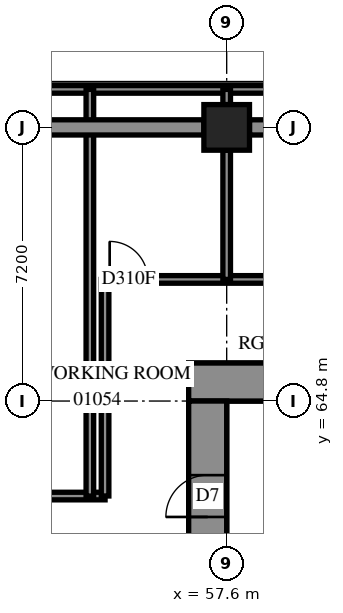
"""IFC4 building model, lengths in metres.
Left out: names, types, materials, properties, quantities, classifications, styles, units other than length and angle.
Written with IfcOpenShell. Run it as: python <this file> out.ifc"""

import sys

from ifc_helpers import new_model, si_unit, direction, frame, frame_2d, origin, origin_2d, place, context, subcontext, project, spatial, rectangle, extrude, element, fill, save


model = new_model("IFC4")
c1 = context("Model", 3, precision=1e-05, world=origin(), true_north=direction((0.0, 1.0)))
c2 = subcontext(c1, "Body", "Model", "MODEL_VIEW")
j1 = project(units=[si_unit("LENGTHUNIT", "METRE"), si_unit("PLANEANGLEUNIT", "RADIAN")], contexts=[c1])
p1 = place(None, origin())
s1 = spatial("IfcSite", under=j1, at=p1, CompositionType="ELEMENT")
p2 = place(p1, origin())
s2 = spatial("IfcBuilding", under=s1, at=p2, CompositionType="ELEMENT")
p3 = place(p2, frame((0.0, 0.0, 6.0)))
s3 = spatial("IfcBuildingStorey", under=s2, at=p3, CompositionType="ELEMENT", Elevation=6.0)
p4 = place(p3, frame((57.6, 72.0, 0.0), z_axis=(0.0, 0.0, 1.0), x_axis=(1.0, 0.0, 0.0)))
e1 = element("IfcColumn", 1, at=p4, inside=s3, PredefinedType="COLUMN", context=c2, shape_type="SweptSolid", body=[
    extrude(rectangle(XDim=1.2, YDim=1.2, at=origin_2d()), origin(), (0.0, 0.0, 1.0), 3.8),
])
p5 = place(p3, frame((56.6, 65.3, -0.4), z_axis=(0.0, 0.0, 1.0), x_axis=(1.0, 0.0, 0.0)))
e2 = element("IfcWall", 2, at=p5, inside=s3, PredefinedType="SHEAR", context=c2, shape_type="SweptSolid", body=[
    extrude(rectangle(XDim=16.4, YDim=1.0, at=frame_2d((8.2, 0.0))), origin(), (0.0, 0.0, 1.0), 3.5),
])
p6 = place(p5, frame((11.0, 0.0, 0.4)))
e3 = element("IfcOpeningElement", 3, at=p6, cuts=e2, PredefinedType="OPENING", context=c2, shape_type="SweptSolid", body=[
    extrude(rectangle(XDim=0.8, YDim=2.1, at=frame_2d((0.4, 1.05))), frame((0.0, 0.51, 0.0), z_axis=(0.0, -1.0, 0.0), x_axis=(1.0, 0.0, 0.0)), (0.0, 0.0, 1.0), 1.02),
])
p7 = place(p3, frame((57.1, 50.4, -0.4), z_axis=(0.0, 0.0, 1.0), x_axis=(0.0, 1.0, 0.0)))
e4 = element("IfcWall", 4, at=p7, inside=s3, PredefinedType="SHEAR", context=c2, shape_type="SweptSolid", body=[
    extrude(rectangle(XDim=14.4, YDim=1.0, at=frame_2d((7.2, 0.0))), origin(), (0.0, 0.0, 1.0), 3.5),
])
p8 = place(p7, frame((4.55, 0.0, 0.4)))
e5 = element("IfcOpeningElement", 5, at=p8, cuts=e4, PredefinedType="OPENING", context=c2, shape_type="SweptSolid", body=[
    extrude(rectangle(XDim=1.1, YDim=2.1, at=frame_2d((0.55, 1.05))), frame((0.0, 0.51, 0.0), z_axis=(0.0, -1.0, 0.0), x_axis=(1.0, 0.0, 0.0)), (0.0, 0.0, 1.0), 1.02),
])
p9 = place(p7, frame((11.35, 0.0, 0.4)))
e6 = element("IfcOpeningElement", 6, at=p9, cuts=e4, PredefinedType="OPENING", context=c2, shape_type="SweptSolid", body=[
    extrude(rectangle(XDim=1.1, YDim=2.1, at=frame_2d((0.55, 1.05))), frame((0.0, 0.51, 0.0), z_axis=(0.0, -1.0, 0.0), x_axis=(1.0, 0.0, 0.0)), (0.0, 0.0, 1.0), 1.02),
])
p10 = place(p3, frame((6.0, 73.0, 0.0), z_axis=(0.0, 0.0, 1.0), x_axis=(1.0, 0.0, 0.0)))
e7 = element("IfcWall", 7, at=p10, inside=s3, PredefinedType="PARTITIONING", context=c2, shape_type="SweptSolid", body=[
    extrude(rectangle(XDim=73.2, YDim=0.2, at=frame_2d((36.6, 0.0))), origin(), (0.0, 0.0, 1.0), 3.8),
])
p11 = place(p3, frame((0.002, 62.3, 0.0), z_axis=(0.0, 0.0, 1.0), x_axis=(1.0, 0.0, 0.0)))
e8 = element("IfcWall", 8, at=p11, inside=s3, PredefinedType="PARTITIONING", context=c2, shape_type="SweptSolid", body=[
    extrude(rectangle(XDim=54.398, YDim=0.2, at=frame_2d((27.199, 0.0))), origin(), (0.0, 0.0, 1.0), 3.8),
])
p12 = place(p11, frame((8.667, 0.0, 0.0)))
e9 = element("IfcOpeningElement", 9, at=p12, cuts=e8, PredefinedType="OPENING", context=c2, shape_type="SweptSolid", body=[
    extrude(rectangle(XDim=1.0, YDim=2.1, at=frame_2d((0.5, 1.05))), frame((0.0, 0.11, 0.0), z_axis=(0.0, -1.0, 0.0), x_axis=(1.0, 0.0, 0.0)), (0.0, 0.0, 1.0), 0.22),
])
p13 = place(p11, frame((13.136, 0.0, 0.0)))
e10 = element("IfcOpeningElement", 10, at=p13, cuts=e8, PredefinedType="OPENING", context=c2, shape_type="SweptSolid", body=[
    extrude(rectangle(XDim=1.0, YDim=2.1, at=frame_2d((0.5, 1.05))), frame((0.0, 0.11, 0.0), z_axis=(0.0, -1.0, 0.0), x_axis=(1.0, 0.0, 0.0)), (0.0, 0.0, 1.0), 0.22),
])
p14 = place(p11, frame((18.566, 0.0, 0.0)))
e11 = element("IfcOpeningElement", 11, at=p14, cuts=e8, PredefinedType="OPENING", context=c2, shape_type="SweptSolid", body=[
    extrude(rectangle(XDim=1.0, YDim=2.1, at=frame_2d((0.5, 1.05))), frame((0.0, 0.11, 0.0), z_axis=(0.0, -1.0, 0.0), x_axis=(1.0, 0.0, 0.0)), (0.0, 0.0, 1.0), 0.22),
])
p15 = place(p11, frame((27.256, 0.0, 0.0)))
e12 = element("IfcOpeningElement", 12, at=p15, cuts=e8, PredefinedType="OPENING", context=c2, shape_type="SweptSolid", body=[
    extrude(rectangle(XDim=1.0, YDim=2.1, at=frame_2d((0.5, 1.05))), frame((0.0, 0.11, 0.0), z_axis=(0.0, -1.0, 0.0), x_axis=(1.0, 0.0, 0.0)), (0.0, 0.0, 1.0), 0.22),
])
p16 = place(p11, frame((34.736, 0.0, 0.0)))
e13 = element("IfcOpeningElement", 13, at=p16, cuts=e8, PredefinedType="OPENING", context=c2, shape_type="SweptSolid", body=[
    extrude(rectangle(XDim=1.0, YDim=2.1, at=frame_2d((0.5, 1.05))), frame((0.0, 0.11, 0.0), z_axis=(0.0, -1.0, 0.0), x_axis=(1.0, 0.0, 0.0)), (0.0, 0.0, 1.0), 0.22),
])
p17 = place(p11, frame((40.166, 0.0, 0.0)))
e14 = element("IfcOpeningElement", 14, at=p17, cuts=e8, PredefinedType="OPENING", context=c2, shape_type="SweptSolid", body=[
    extrude(rectangle(XDim=1.0, YDim=2.1, at=frame_2d((0.5, 1.05))), frame((0.0, 0.11, 0.0), z_axis=(0.0, -1.0, 0.0), x_axis=(1.0, 0.0, 0.0)), (0.0, 0.0, 1.0), 0.22),
])
p18 = place(p11, frame((45.291, 0.0, 0.0)))
e15 = element("IfcOpeningElement", 15, at=p18, cuts=e8, PredefinedType="OPENING", context=c2, shape_type="SweptSolid", body=[
    extrude(rectangle(XDim=1.0, YDim=2.1, at=frame_2d((0.5, 1.05))), frame((0.0, 0.11, 0.0), z_axis=(0.0, -1.0, 0.0), x_axis=(1.0, 0.0, 0.0)), (0.0, 0.0, 1.0), 0.22),
])
p19 = place(p11, frame((49.136, 0.0, 0.0)))
e16 = element("IfcOpeningElement", 16, at=p19, cuts=e8, PredefinedType="OPENING", context=c2, shape_type="SweptSolid", body=[
    extrude(rectangle(XDim=1.0, YDim=2.1, at=frame_2d((0.5, 1.05))), frame((0.0, 0.11, 0.0), z_axis=(0.0, -1.0, 0.0), x_axis=(1.0, 0.0, 0.0)), (0.0, 0.0, 1.0), 0.22),
])
p20 = place(p11, frame((4.807, 0.0, 0.0)))
e17 = element("IfcOpeningElement", 17, at=p20, cuts=e8, PredefinedType="OPENING", context=c2, shape_type="SweptSolid", body=[
    extrude(rectangle(XDim=1.0, YDim=2.1, at=frame_2d((0.5, 1.05))), frame((0.0, 0.11, 0.0), z_axis=(0.0, -1.0, 0.0), x_axis=(1.0, 0.0, 0.0)), (0.0, 0.0, 1.0), 0.22),
])
p21 = place(p3, frame((54.4, 68.0, 0.0), z_axis=(0.0, 0.0, 1.0), x_axis=(1.0, 0.0, 0.0)))
e18 = element("IfcWall", 18, at=p21, inside=s3, PredefinedType="PARTITIONING", context=c2, shape_type="SweptSolid", body=[
    extrude(rectangle(XDim=20.8, YDim=0.2, at=frame_2d((10.4, 0.0))), origin(), (0.0, 0.0, 1.0), 3.8),
])
p22 = place(p21, frame((0.121, 0.0, 0.0)))
e19 = element("IfcOpeningElement", 19, at=p22, cuts=e18, PredefinedType="OPENING", context=c2, shape_type="SweptSolid", body=[
    extrude(rectangle(XDim=1.0, YDim=2.1, at=frame_2d((0.5, 1.05))), frame((0.0, 0.11, 0.0), z_axis=(0.0, -1.0, 0.0), x_axis=(1.0, 0.0, 0.0)), (0.0, 0.0, 1.0), 0.22),
])
p23 = place(p21, frame((19.622, 0.0, 0.0)))
e20 = element("IfcOpeningElement", 20, at=p23, cuts=e18, PredefinedType="OPENING", context=c2, shape_type="SweptSolid", body=[
    extrude(rectangle(XDim=1.0, YDim=2.1, at=frame_2d((0.5, 1.05))), frame((0.0, 0.11, 0.0), z_axis=(0.0, -1.0, 0.0), x_axis=(1.0, 0.0, 0.0)), (0.0, 0.0, 1.0), 0.22),
])
p24 = place(p21, frame((8.858, 0.0, 0.0)))
e21 = element("IfcOpeningElement", 21, at=p24, cuts=e18, PredefinedType="OPENING", context=c2, shape_type="SweptSolid", body=[
    extrude(rectangle(XDim=1.0, YDim=2.1, at=frame_2d((0.5, 1.05))), frame((0.0, 0.11, 0.0), z_axis=(0.0, -1.0, 0.0), x_axis=(1.0, 0.0, 0.0)), (0.0, 0.0, 1.0), 0.22),
])
p25 = place(p21, frame((14.568, 0.0, 0.0)))
e22 = element("IfcOpeningElement", 22, at=p25, cuts=e18, PredefinedType="OPENING", context=c2, shape_type="SweptSolid", body=[
    extrude(rectangle(XDim=1.0, YDim=2.1, at=frame_2d((0.5, 1.05))), frame((0.0, 0.11, 0.0), z_axis=(0.0, -1.0, 0.0), x_axis=(1.0, 0.0, 0.0)), (0.0, 0.0, 1.0), 0.22),
])
p26 = place(p3, frame((54.0, 62.3, 0.0), z_axis=(0.0, 0.0, 1.0), x_axis=(0.0, 1.0, 0.0)))
e23 = element("IfcWall", 23, at=p26, inside=s3, PredefinedType="PARTITIONING", context=c2, shape_type="SweptSolid", body=[
    extrude(rectangle(XDim=10.7, YDim=0.2, at=frame_2d((5.35, 0.0))), origin(), (0.0, 0.0, 1.0), 3.8),
])
p27 = place(p3, frame((54.4, 62.302, 0.0), z_axis=(0.0, 0.0, 1.0), x_axis=(0.0, 1.0, 0.0)))
e24 = element("IfcWall", 24, at=p27, inside=s3, PredefinedType="PARTITIONING", context=c2, shape_type="SweptSolid", body=[
    extrude(rectangle(XDim=5.698, YDim=0.2, at=frame_2d((2.849, 0.0))), origin(), (0.0, 0.0, 1.0), 3.8),
])
p28 = place(p3, frame((57.6, 68.0, 0.0), z_axis=(0.0, 0.0, 1.0), x_axis=(0.0, 1.0, 0.0)))
e25 = element("IfcWall", 25, at=p28, inside=s3, PredefinedType="PARTITIONING", context=c2, shape_type="SweptSolid", body=[
    extrude(rectangle(XDim=3.4, YDim=0.2, at=frame_2d((1.7, 0.0))), origin(), (0.0, 0.0, 1.0), 3.8),
])
p29 = place(p3, frame((57.6, 72.6, 0.0), z_axis=(0.0, 0.0, 1.0), x_axis=(0.0, 1.0, 0.0)))
e26 = element("IfcWall", 26, at=p29, inside=s3, PredefinedType="PARTITIONING", context=c2, shape_type="SweptSolid", body=[
    extrude(rectangle(XDim=0.4, YDim=0.2, at=frame_2d((0.2, 0.0))), origin(), (0.0, 0.0, 1.0), 3.8),
])
p30 = place(p9, origin())
e27 = element("IfcDoor", 27, at=p30, inside=s3, OperationType="SINGLE_SWING_LEFT", PredefinedType="DOOR", context=c2, shape_type="SweptSolid", body=[
    extrude(rectangle(XDim=1.1, YDim=2.1, at=frame_2d((0.55, 1.05))), frame((0.0, 0.025, 0.0), z_axis=(0.0, -1.0, 0.0), x_axis=(1.0, 0.0, 0.0)), (0.0, 0.0, 1.0), 0.05),
])
fill(e6, e27)
p31 = place(p22, origin())
e28 = element("IfcDoor", 28, at=p31, inside=s3, OperationType="SINGLE_SWING_LEFT", PredefinedType="DOOR", context=c2, shape_type="SweptSolid", body=[
    extrude(rectangle(XDim=1.0, YDim=2.1, at=frame_2d((0.5, 1.05))), frame((0.0, 0.025, 0.0), z_axis=(0.0, -1.0, 0.0), x_axis=(1.0, 0.0, 0.0)), (0.0, 0.0, 1.0), 0.05),
])
fill(e19, e28)
save(model, sys.argv[1])
